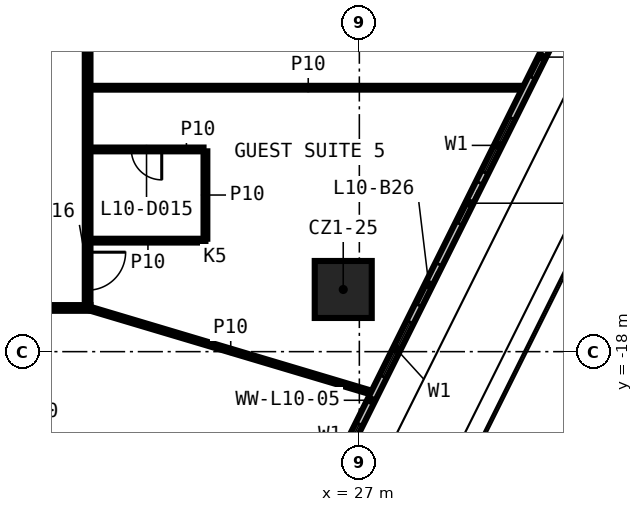
"""IFC4 building model, lengths in metres.
Left out: names, types, materials, properties, quantities, classifications, styles, units other than length and angle.
Written with IfcOpenShell. Run it as: python <this file> out.ifc"""

import sys

from ifc_helpers import new_model, si_unit, direction, frame, frame_2d, origin, origin_2d, place, context, subcontext, project, spatial, rectangle, extrude, element, fill, save


model = new_model("IFC4")
c1 = context("Model", 3, precision=1e-05, world=origin(), true_north=direction((0.0, 1.0)))
c2 = subcontext(c1, "Body", "Model", "MODEL_VIEW")
j1 = project(units=[si_unit("LENGTHUNIT", "METRE"), si_unit("PLANEANGLEUNIT", "RADIAN")], contexts=[c1])
p1 = place(None, origin())
s1 = spatial("IfcSite", under=j1, at=p1, CompositionType="ELEMENT")
p2 = place(p1, origin())
s2 = spatial("IfcBuilding", under=s1, at=p2, CompositionType="ELEMENT")
p3 = place(p2, frame((0.0, 0.0, 58.8)))
s3 = spatial("IfcBuildingStorey", under=s2, at=p3, CompositionType="ELEMENT", Elevation=58.8)
p4 = place(p3, frame((26.576, -16.364, 0.0), z_axis=(0.0, 0.0, 1.0), x_axis=(1.0, 0.0, 0.0)))
e1 = element("IfcColumn", 1, at=p4, inside=s3, PredefinedType="COLUMN", context=c2, shape_type="SweptSolid", body=[
    extrude(rectangle(XDim=1.5, YDim=1.5, at=origin_2d()), origin(), (0.0, 0.0, 1.0), 3.3),
])
p5 = place(p3, frame((19.925, -16.85, 0.0), z_axis=(0.0, 0.0, 1.0), x_axis=(-1.0, 0.0, 0.0)))
e2 = element("IfcWall", 2, at=p5, inside=s3, PredefinedType="PARTITIONING", context=c2, shape_type="SweptSolid", body=[
    extrude(rectangle(XDim=39.85, YDim=0.15, at=frame_2d((19.925, 0.0))), origin(), (0.0, 0.0, 1.0), 3.3),
])
p6 = place(p5, frame((35.041, 0.0, 0.0)))
e3 = element("IfcOpeningElement", 3, at=p6, cuts=e2, PredefinedType="OPENING", context=c2, shape_type="SweptSolid", body=[
    extrude(rectangle(XDim=0.9, YDim=2.1, at=frame_2d((0.45, 1.05))), frame((0.0, 0.085, 0.0), z_axis=(0.0, -1.0, 0.0), x_axis=(1.0, 0.0, 0.0)), (0.0, 0.0, 1.0), 0.17),
])
p7 = place(p5, frame((31.0, 0.0, 0.0)))
e4 = element("IfcOpeningElement", 4, at=p7, cuts=e2, PredefinedType="OPENING", context=c2, shape_type="SweptSolid", body=[
    extrude(rectangle(XDim=1.0, YDim=2.1, at=frame_2d((0.5, 1.05))), frame((0.0, 0.085, 0.0), z_axis=(0.0, -1.0, 0.0), x_axis=(1.0, 0.0, 0.0)), (0.0, 0.0, 1.0), 0.17),
])
p8 = place(p5, frame((25.711, 0.0, 0.0)))
e5 = element("IfcOpeningElement", 5, at=p8, cuts=e2, PredefinedType="OPENING", context=c2, shape_type="SweptSolid", body=[
    extrude(rectangle(XDim=0.9, YDim=2.1, at=frame_2d((0.45, 1.05))), frame((0.0, 0.085, 0.0), z_axis=(0.0, -1.0, 0.0), x_axis=(1.0, 0.0, 0.0)), (0.0, 0.0, 1.0), 0.17),
])
p9 = place(p5, frame((22.072, 0.0, 0.0)))
e6 = element("IfcOpeningElement", 6, at=p9, cuts=e2, PredefinedType="OPENING", context=c2, shape_type="SweptSolid", body=[
    extrude(rectangle(XDim=0.9, YDim=2.1, at=frame_2d((0.45, 1.05))), frame((0.0, 0.085, 0.0), z_axis=(0.0, -1.0, 0.0), x_axis=(1.0, 0.0, 0.0)), (0.0, 0.0, 1.0), 0.17),
])
p10 = place(p5, frame((17.034, 0.0, 0.0)))
e7 = element("IfcOpeningElement", 7, at=p10, cuts=e2, PredefinedType="OPENING", context=c2, shape_type="SweptSolid", body=[
    extrude(rectangle(XDim=0.9, YDim=2.1, at=frame_2d((0.45, 1.05))), frame((0.0, 0.085, 0.0), z_axis=(0.0, -1.0, 0.0), x_axis=(1.0, 0.0, 0.0)), (0.0, 0.0, 1.0), 0.17),
])
p11 = place(p5, frame((13.675, 0.0, 0.0)))
e8 = element("IfcOpeningElement", 8, at=p11, cuts=e2, PredefinedType="OPENING", context=c2, shape_type="SweptSolid", body=[
    extrude(rectangle(XDim=0.9, YDim=2.1, at=frame_2d((0.45, 1.05))), frame((0.0, 0.085, 0.0), z_axis=(0.0, -1.0, 0.0), x_axis=(1.0, 0.0, 0.0)), (0.0, 0.0, 1.0), 0.17),
])
p12 = place(p5, frame((4.031, 0.0, 0.0)))
e9 = element("IfcOpeningElement", 9, at=p12, cuts=e2, PredefinedType="OPENING", context=c2, shape_type="SweptSolid", body=[
    extrude(rectangle(XDim=1.0, YDim=2.1, at=frame_2d((0.5, 1.05))), frame((0.0, 0.085, 0.0), z_axis=(0.0, -1.0, 0.0), x_axis=(1.0, 0.0, 0.0)), (0.0, 0.0, 1.0), 0.17),
])
p13 = place(p3, frame((19.925, -15.079, 0.0), z_axis=(0.0, 0.0, 1.0), x_axis=(1.0, 0.0, 0.0)))
e10 = element("IfcWall", 10, at=p13, inside=s3, PredefinedType="PARTITIONING", context=c2, shape_type="SweptSolid", body=[
    extrude(rectangle(XDim=3.025, YDim=0.1, at=frame_2d((1.512, 0.0))), origin(), (0.0, 0.0, 1.0), 3.3),
])
p14 = place(p3, frame((22.9, -12.679, 0.0), z_axis=(0.0, 0.0, 1.0), x_axis=(-1.0, 0.0, 0.0)))
e11 = element("IfcWall", 11, at=p14, inside=s3, PredefinedType="PARTITIONING", context=c2, shape_type="SweptSolid", body=[
    extrude(rectangle(XDim=2.975, YDim=0.1, at=frame_2d((1.487, 0.0))), origin(), (0.0, 0.0, 1.0), 3.3),
])
p15 = place(p14, frame((1.1, 0.0, 0.0)))
e12 = element("IfcOpeningElement", 12, at=p15, cuts=e11, PredefinedType="OPENING", context=c2, shape_type="SweptSolid", body=[
    extrude(rectangle(XDim=0.8, YDim=2.1, at=frame_2d((0.4, 1.05))), frame((0.0, 0.06, 0.0), z_axis=(0.0, -1.0, 0.0), x_axis=(1.0, 0.0, 0.0)), (0.0, 0.0, 1.0), 0.12),
])
p16 = place(p3, frame((19.925, -11.055, 0.0), z_axis=(0.0, 0.0, 1.0), x_axis=(1.0, 0.0, 0.0)))
e13 = element("IfcWall", 13, at=p16, inside=s3, PredefinedType="PARTITIONING", context=c2, shape_type="SweptSolid", body=[
    extrude(rectangle(XDim=11.46, YDim=0.1, at=frame_2d((5.73, 0.0))), origin(), (0.0, 0.0, 1.0), 3.3),
])
p17 = place(p3, frame((22.95, -15.029, 0.0), z_axis=(0.0, 0.0, 1.0), x_axis=(0.0, 1.0, 0.0)))
e14 = element("IfcWall", 14, at=p17, inside=s3, PredefinedType="PARTITIONING", context=c2, shape_type="SweptSolid", body=[
    extrude(rectangle(XDim=2.3, YDim=0.1, at=frame_2d((1.15, 0.0))), origin(), (0.0, 0.0, 1.0), 3.3),
])
p18 = place(p3, frame((19.85, 16.775, 0.0), z_axis=(0.0, 0.0, 1.0), x_axis=(0.0, -1.0, 0.0)))
e15 = element("IfcWall", 15, at=p18, inside=s3, PredefinedType="PARTITIONING", context=c2, shape_type="SweptSolid", body=[
    extrude(rectangle(XDim=33.55, YDim=0.15, at=frame_2d((16.775, 0.0))), origin(), (0.0, 0.0, 1.0), 3.3),
])
p19 = place(p18, frame((32.158, 0.0, 0.0)))
e16 = element("IfcOpeningElement", 16, at=p19, cuts=e15, PredefinedType="OPENING", context=c2, shape_type="SweptSolid", body=[
    extrude(rectangle(XDim=1.0, YDim=2.1, at=frame_2d((0.5, 1.05))), frame((0.0, 0.085, 0.0), z_axis=(0.0, -1.0, 0.0), x_axis=(1.0, 0.0, 0.0)), (0.0, 0.0, 1.0), 0.17),
])
p20 = place(p18, frame((20.094, 0.0, 0.0)))
e17 = element("IfcOpeningElement", 17, at=p20, cuts=e15, PredefinedType="OPENING", context=c2, shape_type="SweptSolid", body=[
    extrude(rectangle(XDim=1.0, YDim=2.1, at=frame_2d((0.5, 1.05))), frame((0.0, 0.085, 0.0), z_axis=(0.0, -1.0, 0.0), x_axis=(1.0, 0.0, 0.0)), (0.0, 0.0, 1.0), 0.17),
])
p21 = place(p18, frame((18.428, 0.0, 0.0)))
e18 = element("IfcOpeningElement", 18, at=p21, cuts=e15, PredefinedType="OPENING", context=c2, shape_type="SweptSolid", body=[
    extrude(rectangle(XDim=1.0, YDim=2.1, at=frame_2d((0.5, 1.05))), frame((0.0, 0.085, 0.0), z_axis=(0.0, -1.0, 0.0), x_axis=(1.0, 0.0, 0.0)), (0.0, 0.0, 1.0), 0.17),
])
p22 = place(p18, frame((10.072, 0.0, 0.0)))
e19 = element("IfcOpeningElement", 19, at=p22, cuts=e15, PredefinedType="OPENING", context=c2, shape_type="SweptSolid", body=[
    extrude(rectangle(XDim=1.0, YDim=2.1, at=frame_2d((0.5, 1.05))), frame((0.0, 0.085, 0.0), z_axis=(0.0, -1.0, 0.0), x_axis=(1.0, 0.0, 0.0)), (0.0, 0.0, 1.0), 0.17),
])
p23 = place(p18, frame((3.156, 0.0, 0.0)))
e20 = element("IfcOpeningElement", 20, at=p23, cuts=e15, PredefinedType="OPENING", context=c2, shape_type="SweptSolid", body=[
    extrude(rectangle(XDim=1.0, YDim=2.1, at=frame_2d((0.5, 1.05))), frame((0.0, 0.085, 0.0), z_axis=(0.0, -1.0, 0.0), x_axis=(1.0, 0.0, 0.0)), (0.0, 0.0, 1.0), 0.17),
])
p24 = place(p3, frame((19.85, -16.85, 0.0), z_axis=(0.0, 0.0, 1.0), x_axis=(0.958273131703, -0.285854167464, 0.0)))
e21 = element("IfcWall", 21, at=p24, inside=s3, PredefinedType="PARTITIONING", context=c2, shape_type="SweptSolid", body=[
    extrude(rectangle(XDim=7.859, YDim=0.1, at=frame_2d((3.93, 0.0))), origin(), (0.0, 0.0, 1.0), 3.3),
])
p25 = place(p3, frame((21.391, -31.175, 0.0), z_axis=(0.0, 0.0, 1.0), x_axis=(0.445673586032, 0.895195539932, 0.0)))
e22 = element("IfcWall", 22, at=p25, inside=s3, PredefinedType="SOLIDWALL", context=c2, shape_type="SweptSolid", body=[
    extrude(rectangle(XDim=31.466, YDim=0.2, at=frame_2d((15.733, 0.0))), origin(), (0.0, 0.0, 1.0), 3.3),
])
p26 = place(p25, frame((2.0, 0.0, 0.6)))
e23 = element("IfcOpeningElement", 23, at=p26, cuts=e22, PredefinedType="OPENING", context=c2, shape_type="SweptSolid", body=[
    extrude(rectangle(XDim=1.6, YDim=2.4, at=frame_2d((0.8, 1.2))), frame((0.0, 0.11, 0.0), z_axis=(0.0, -1.0, 0.0), x_axis=(1.0, 0.0, 0.0)), (0.0, 0.0, 1.0), 0.22),
])
p27 = place(p25, frame((0.5, 0.0, 0.0)))
e24 = element("IfcOpeningElement", 24, at=p27, cuts=e22, PredefinedType="OPENING", context=c2, shape_type="SweptSolid", body=[
    extrude(rectangle(XDim=1.2, YDim=2.4, at=frame_2d((0.6, 1.2))), frame((0.0, 0.11, 0.0), z_axis=(0.0, -1.0, 0.0), x_axis=(1.0, 0.0, 0.0)), (0.0, 0.0, 1.0), 0.22),
])
p28 = place(p25, frame((4.995, 0.0, 0.6)))
e25 = element("IfcOpeningElement", 25, at=p28, cuts=e22, PredefinedType="OPENING", context=c2, shape_type="SweptSolid", body=[
    extrude(rectangle(XDim=1.6, YDim=2.4, at=frame_2d((0.8, 1.2))), frame((0.0, 0.11, 0.0), z_axis=(0.0, -1.0, 0.0), x_axis=(1.0, 0.0, 0.0)), (0.0, 0.0, 1.0), 0.22),
])
p29 = place(p25, frame((7.495, 0.0, 0.0)))
e26 = element("IfcOpeningElement", 26, at=p29, cuts=e22, PredefinedType="OPENING", context=c2, shape_type="SweptSolid", body=[
    extrude(rectangle(XDim=1.2, YDim=2.4, at=frame_2d((0.6, 1.2))), frame((0.0, 0.11, 0.0), z_axis=(0.0, -1.0, 0.0), x_axis=(1.0, 0.0, 0.0)), (0.0, 0.0, 1.0), 0.22),
])
p30 = place(p25, frame((10.99, 0.0, 0.6)))
e27 = element("IfcOpeningElement", 27, at=p30, cuts=e22, PredefinedType="OPENING", context=c2, shape_type="SweptSolid", body=[
    extrude(rectangle(XDim=1.6, YDim=2.4, at=frame_2d((0.8, 1.2))), frame((0.0, 0.11, 0.0), z_axis=(0.0, -1.0, 0.0), x_axis=(1.0, 0.0, 0.0)), (0.0, 0.0, 1.0), 0.22),
])
p31 = place(p25, frame((9.49, 0.0, 0.0)))
e28 = element("IfcOpeningElement", 28, at=p31, cuts=e22, PredefinedType="OPENING", context=c2, shape_type="SweptSolid", body=[
    extrude(rectangle(XDim=1.2, YDim=2.4, at=frame_2d((0.6, 1.2))), frame((0.0, 0.11, 0.0), z_axis=(0.0, -1.0, 0.0), x_axis=(1.0, 0.0, 0.0)), (0.0, 0.0, 1.0), 0.22),
])
p32 = place(p25, frame((13.986, 0.0, 0.6)))
e29 = element("IfcOpeningElement", 29, at=p32, cuts=e22, PredefinedType="OPENING", context=c2, shape_type="SweptSolid", body=[
    extrude(rectangle(XDim=1.6, YDim=2.4, at=frame_2d((0.8, 1.2))), frame((0.0, 0.11, 0.0), z_axis=(0.0, -1.0, 0.0), x_axis=(1.0, 0.0, 0.0)), (0.0, 0.0, 1.0), 0.22),
])
p33 = place(p25, frame((16.085, 0.0, 0.0)))
e30 = element("IfcOpeningElement", 30, at=p33, cuts=e22, PredefinedType="OPENING", context=c2, shape_type="SweptSolid", body=[
    extrude(rectangle(XDim=1.2, YDim=2.4, at=frame_2d((0.6, 1.2))), frame((0.0, 0.11, 0.0), z_axis=(0.0, -1.0, 0.0), x_axis=(1.0, 0.0, 0.0)), (0.0, 0.0, 1.0), 0.22),
])
p34 = place(p25, frame((19.981, 0.0, 0.6)))
e31 = element("IfcOpeningElement", 31, at=p34, cuts=e22, PredefinedType="OPENING", context=c2, shape_type="SweptSolid", body=[
    extrude(rectangle(XDim=1.6, YDim=2.4, at=frame_2d((0.8, 1.2))), frame((0.0, 0.11, 0.0), z_axis=(0.0, -1.0, 0.0), x_axis=(1.0, 0.0, 0.0)), (0.0, 0.0, 1.0), 0.22),
])
p35 = place(p25, frame((18.481, 0.0, 0.0)))
e32 = element("IfcOpeningElement", 32, at=p35, cuts=e22, PredefinedType="OPENING", context=c2, shape_type="SweptSolid", body=[
    extrude(rectangle(XDim=1.2, YDim=2.4, at=frame_2d((0.6, 1.2))), frame((0.0, 0.11, 0.0), z_axis=(0.0, -1.0, 0.0), x_axis=(1.0, 0.0, 0.0)), (0.0, 0.0, 1.0), 0.22),
])
p36 = place(p25, frame((24.476, 0.0, 0.6)))
e33 = element("IfcOpeningElement", 33, at=p36, cuts=e22, PredefinedType="OPENING", context=c2, shape_type="SweptSolid", body=[
    extrude(rectangle(XDim=1.6, YDim=2.4, at=frame_2d((0.8, 1.2))), frame((0.0, 0.11, 0.0), z_axis=(0.0, -1.0, 0.0), x_axis=(1.0, 0.0, 0.0)), (0.0, 0.0, 1.0), 0.22),
])
p37 = place(p25, frame((22.776, 0.0, 0.0)))
e34 = element("IfcOpeningElement", 34, at=p37, cuts=e22, PredefinedType="OPENING", context=c2, shape_type="SweptSolid", body=[
    extrude(rectangle(XDim=1.2, YDim=2.4, at=frame_2d((0.6, 1.2))), frame((0.0, 0.11, 0.0), z_axis=(0.0, -1.0, 0.0), x_axis=(1.0, 0.0, 0.0)), (0.0, 0.0, 1.0), 0.22),
])
p38 = place(p25, frame((28.971, 0.0, 0.6)))
e35 = element("IfcOpeningElement", 35, at=p38, cuts=e22, PredefinedType="OPENING", context=c2, shape_type="SweptSolid", body=[
    extrude(rectangle(XDim=1.6, YDim=2.4, at=frame_2d((0.8, 1.2))), frame((0.0, 0.11, 0.0), z_axis=(0.0, -1.0, 0.0), x_axis=(1.0, 0.0, 0.0)), (0.0, 0.0, 1.0), 0.22),
])
p39 = place(p25, frame((27.471, 0.0, 0.0)))
e36 = element("IfcOpeningElement", 36, at=p39, cuts=e22, PredefinedType="OPENING", context=c2, shape_type="SweptSolid", body=[
    extrude(rectangle(XDim=1.2, YDim=2.4, at=frame_2d((0.6, 1.2))), frame((0.0, 0.11, 0.0), z_axis=(0.0, -1.0, 0.0), x_axis=(1.0, 0.0, 0.0)), (0.0, 0.0, 1.0), 0.22),
])
p40 = place(p15, origin())
e37 = element("IfcDoor", 37, at=p40, inside=s3, OperationType="SINGLE_SWING_LEFT", PredefinedType="DOOR", context=c2, shape_type="SweptSolid", body=[
    extrude(rectangle(XDim=0.8, YDim=2.1, at=frame_2d((0.4, 1.05))), frame((0.0, 0.025, 0.0), z_axis=(0.0, -1.0, 0.0), x_axis=(1.0, 0.0, 0.0)), (0.0, 0.0, 1.0), 0.05),
])
fill(e12, e37)
p41 = place(p19, origin())
e38 = element("IfcDoor", 38, at=p41, inside=s3, OperationType="SINGLE_SWING_RIGHT", PredefinedType="DOOR", context=c2, shape_type="SweptSolid", body=[
    extrude(rectangle(XDim=1.0, YDim=2.1, at=frame_2d((0.5, 1.05))), frame((0.0, 0.025, 0.0), z_axis=(0.0, -1.0, 0.0), x_axis=(1.0, 0.0, 0.0)), (0.0, 0.0, 1.0), 0.05),
])
fill(e16, e38)
p42 = place(p30, origin())
e39 = element("IfcWindow", 39, at=p42, inside=s3, PartitioningType="SINGLE_PANEL", PredefinedType="WINDOW", context=c2, shape_type="SweptSolid", body=[
    extrude(rectangle(XDim=1.6, YDim=2.4, at=frame_2d((0.8, 1.2))), frame((0.0, 0.03, 0.0), z_axis=(0.0, -1.0, 0.0), x_axis=(1.0, 0.0, 0.0)), (0.0, 0.0, 1.0), 0.06),
])
fill(e27, e39)
p43 = place(p32, origin())
e40 = element("IfcWindow", 40, at=p43, inside=s3, PartitioningType="SINGLE_PANEL", PredefinedType="WINDOW", context=c2, shape_type="SweptSolid", body=[
    extrude(rectangle(XDim=1.6, YDim=2.4, at=frame_2d((0.8, 1.2))), frame((0.0, 0.03, 0.0), z_axis=(0.0, -1.0, 0.0), x_axis=(1.0, 0.0, 0.0)), (0.0, 0.0, 1.0), 0.06),
])
fill(e29, e40)
p44 = place(p33, origin())
e41 = element("IfcDoor", 41, at=p44, inside=s3, OperationType="SLIDING_TO_LEFT", PredefinedType="DOOR", context=c2, shape_type="SweptSolid", body=[
    extrude(rectangle(XDim=1.2, YDim=2.4, at=frame_2d((0.6, 1.2))), frame((0.0, 0.025, 0.0), z_axis=(0.0, -1.0, 0.0), x_axis=(1.0, 0.0, 0.0)), (0.0, 0.0, 1.0), 0.05),
])
fill(e30, e41)
p45 = place(p34, origin())
e42 = element("IfcWindow", 42, at=p45, inside=s3, PartitioningType="SINGLE_PANEL", PredefinedType="WINDOW", context=c2, shape_type="SweptSolid", body=[
    extrude(rectangle(XDim=1.6, YDim=2.4, at=frame_2d((0.8, 1.2))), frame((0.0, 0.03, 0.0), z_axis=(0.0, -1.0, 0.0), x_axis=(1.0, 0.0, 0.0)), (0.0, 0.0, 1.0), 0.06),
])
fill(e31, e42)
p46 = place(p35, origin())
e43 = element("IfcDoor", 43, at=p46, inside=s3, OperationType="SLIDING_TO_LEFT", PredefinedType="DOOR", context=c2, shape_type="SweptSolid", body=[
    extrude(rectangle(XDim=1.2, YDim=2.4, at=frame_2d((0.6, 1.2))), frame((0.0, 0.025, 0.0), z_axis=(0.0, -1.0, 0.0), x_axis=(1.0, 0.0, 0.0)), (0.0, 0.0, 1.0), 0.05),
])
fill(e32, e43)
p47 = place(p37, origin())
e44 = element("IfcDoor", 44, at=p47, inside=s3, OperationType="SLIDING_TO_LEFT", PredefinedType="DOOR", context=c2, shape_type="SweptSolid", body=[
    extrude(rectangle(XDim=1.2, YDim=2.4, at=frame_2d((0.6, 1.2))), frame((0.0, 0.025, 0.0), z_axis=(0.0, -1.0, 0.0), x_axis=(1.0, 0.0, 0.0)), (0.0, 0.0, 1.0), 0.05),
])
fill(e34, e44)
save(model, sys.argv[1])
